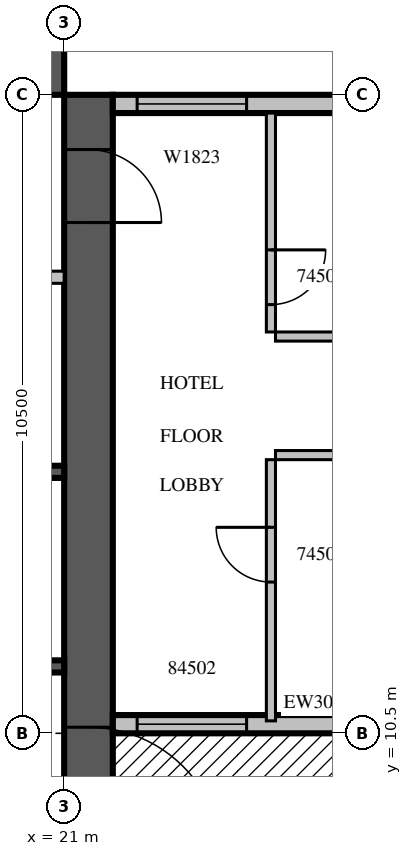
"""IFC4 building model, lengths in metres.
Left out: names, types, materials, properties, quantities, classifications, styles, units other than length and angle.
Written with IfcOpenShell. Run it as: python <this file> out.ifc"""

import sys

from ifc_helpers import new_model, si_unit, direction, frame, frame_2d, origin, place, context, subcontext, project, spatial, rectangle, extrude, source, transform, mapped, element, fill, save


model = new_model("IFC4")
c1 = context("Model", 3, precision=1e-05, world=origin(), true_north=direction((0.0, 1.0)))
c2 = subcontext(c1, "Body", "Model", "MODEL_VIEW")
j1 = project(units=[si_unit("LENGTHUNIT", "METRE"), si_unit("PLANEANGLEUNIT", "RADIAN")], contexts=[c1])
p1 = place(None, origin())
s1 = spatial("IfcSite", under=j1, at=p1, CompositionType="ELEMENT")
p2 = place(p1, origin())
s2 = spatial("IfcBuilding", under=s1, at=p2, CompositionType="ELEMENT")
p3 = place(p2, frame((0.0, 0.0, 204.4)))
s3 = spatial("IfcBuildingStorey", under=s2, at=p3, CompositionType="ELEMENT", Elevation=204.4)
m1 = source(origin(), c2, "Body", "SweptSolid", [
    extrude(rectangle(XDim=16.8, YDim=0.8, at=frame_2d((8.4, 0.0))), origin(), (0.0, 0.0, 1.0), 3.8),
])
p4 = place(p3, frame((21.4, 4.2, 0.0), z_axis=(0.0, 0.0, 1.0), x_axis=(0.0, 1.0, 0.0)))
e1 = element("IfcWall", 1, at=p4, inside=s3, PredefinedType="SHEAR", context=c2, shape_type="MappedRepresentation", body=[
    mapped(m1, transform((0.0, 0.0, 0.0), scale=1.0)),
])
m2 = source(origin(), c2, "Body", "SweptSolid", [
    extrude(rectangle(XDim=2.2, YDim=2.1, at=frame_2d((1.1, 1.05))), frame((0.0, 0.41, 0.0), z_axis=(0.0, -1.0, 0.0), x_axis=(1.0, 0.0, 0.0)), (0.0, 0.0, 1.0), 0.82),
])
p5 = place(p4, frame((4.2, 0.0, 0.0)))
e2 = element("IfcOpeningElement", 2, at=p5, cuts=e1, PredefinedType="OPENING", context=c2, shape_type="MappedRepresentation", body=[
    mapped(m2, transform((0.0, 0.0, 0.0), scale=1.0)),
])
m3 = source(origin(), c2, "Body", "SweptSolid", [
    extrude(rectangle(XDim=1.2, YDim=2.1, at=frame_2d((0.6, 1.05))), frame((0.0, 0.41, 0.0), z_axis=(0.0, -1.0, 0.0), x_axis=(1.0, 0.0, 0.0)), (0.0, 0.0, 1.0), 0.82),
])
p6 = place(p4, frame((14.7, 0.0, 0.0)))
e3 = element("IfcOpeningElement", 3, at=p6, cuts=e1, PredefinedType="OPENING", context=c2, shape_type="MappedRepresentation", body=[
    mapped(m3, transform((0.0, 0.0, 0.0), scale=1.0)),
])
p7 = place(p3, frame((4.2, 21.4, 0.0), z_axis=(0.0, 0.0, 1.0), x_axis=(1.0, 0.0, 0.0)))
e4 = element("IfcWall", 4, at=p7, inside=s3, PredefinedType="SHEAR", context=c2, shape_type="MappedRepresentation", body=[
    mapped(m1, transform((0.0, 0.0, 0.0), scale=1.0)),
])
p8 = place(p7, frame((6.2, 0.0, 0.0)))
e5 = element("IfcOpeningElement", 5, at=p8, cuts=e4, PredefinedType="OPENING", context=c2, shape_type="MappedRepresentation", body=[
    mapped(m3, transform((0.0, 0.0, 0.0), scale=1.0)),
])
p9 = place(p3, frame((21.8, 10.65, 0.0), z_axis=(0.0, 0.0, 1.0), x_axis=(1.0, 0.0, 0.0)))
e6 = element("IfcWall", 6, at=p9, inside=s3, PredefinedType="STANDARD", context=c2, shape_type="SweptSolid", body=[
    extrude(rectangle(XDim=7.15, YDim=0.3, at=frame_2d((3.575, 0.0))), origin(), (0.0, 0.0, 1.0), 2.4),
])
m4 = source(origin(), c2, "Body", "SweptSolid", [
    extrude(rectangle(XDim=1.8, YDim=2.4, at=frame_2d((0.9, 1.2))), frame((0.0, 0.16, 0.0), z_axis=(0.0, -1.0, 0.0), x_axis=(1.0, 0.0, 0.0)), (0.0, 0.0, 1.0), 0.32),
])
p10 = place(p9, frame((0.4, 0.0, 0.0)))
e7 = element("IfcOpeningElement", 7, at=p10, cuts=e6, PredefinedType="OPENING", context=c2, shape_type="MappedRepresentation", body=[
    mapped(m4, transform((0.0, 0.0, 0.0), scale=1.0)),
])
p11 = place(p9, frame((4.6, 0.0, 0.0)))
e8 = element("IfcOpeningElement", 8, at=p11, cuts=e6, PredefinedType="OPENING", context=c2, shape_type="MappedRepresentation", body=[
    mapped(m4, transform((0.0, 0.0, 0.0), scale=1.0)),
])
m5 = source(origin(), c2, "Body", "SweptSolid", [
    extrude(rectangle(XDim=7.15, YDim=0.3, at=frame_2d((3.575, 0.0))), origin(), (0.0, 0.0, 1.0), 3.4),
])
p12 = place(p3, frame((28.95, 20.85, 0.0), z_axis=(0.0, 0.0, 1.0), x_axis=(-1.0, 0.0, 0.0)))
e9 = element("IfcWall", 9, at=p12, inside=s3, PredefinedType="STANDARD", context=c2, shape_type="MappedRepresentation", body=[
    mapped(m5, transform((0.0, 0.0, 0.0), scale=1.0)),
])
m6 = source(origin(), c2, "Body", "SweptSolid", [
    extrude(rectangle(XDim=3.0, YDim=2.3, at=frame_2d((1.5, 1.15))), frame((0.0, 0.16, 0.0), z_axis=(0.0, -1.0, 0.0), x_axis=(1.0, 0.0, 0.0)), (0.0, 0.0, 1.0), 0.32),
])
p13 = place(p12, frame((0.15, 0.0, 0.6)))
e10 = element("IfcOpeningElement", 10, at=p13, cuts=e9, PredefinedType="OPENING", context=c2, shape_type="MappedRepresentation", body=[
    mapped(m6, transform((0.0, 0.0, 0.0), scale=1.0)),
])
m7 = source(origin(), c2, "Body", "SweptSolid", [
    extrude(rectangle(XDim=1.8, YDim=2.3, at=frame_2d((0.9, 1.15))), frame((0.0, 0.16, 0.0), z_axis=(0.0, -1.0, 0.0), x_axis=(1.0, 0.0, 0.0)), (0.0, 0.0, 1.0), 0.32),
])
p14 = place(p12, frame((4.95, 0.0, 0.6)))
e11 = element("IfcOpeningElement", 11, at=p14, cuts=e9, PredefinedType="OPENING", context=c2, shape_type="MappedRepresentation", body=[
    mapped(m7, transform((0.0, 0.0, 0.0), scale=1.0)),
])
m8 = source(origin(), c2, "Body", "SweptSolid", [
    extrude(rectangle(XDim=9.6, YDim=0.2, at=frame_2d((4.8, 0.0))), origin(), (0.0, 0.0, 1.0), 3.8),
])
p15 = place(p3, frame((11.4, 11.6, 0.0), z_axis=(0.0, 0.0, 1.0), x_axis=(1.0, 0.0, 0.0)))
e12 = element("IfcWall", 12, at=p15, inside=s3, PredefinedType="SOLIDWALL", context=c2, shape_type="MappedRepresentation", body=[
    mapped(m8, transform((0.0, 0.0, 0.0), scale=1.0)),
])
p16 = place(p3, frame((11.4, 14.8, 0.0), z_axis=(0.0, 0.0, 1.0), x_axis=(1.0, 0.0, 0.0)))
e13 = element("IfcWall", 13, at=p16, inside=s3, PredefinedType="SOLIDWALL", context=c2, shape_type="MappedRepresentation", body=[
    mapped(m8, transform((0.0, 0.0, 0.0), scale=1.0)),
])
m9 = source(origin(), c2, "Body", "SweptSolid", [
    extrude(rectangle(XDim=1.1, YDim=2.1, at=frame_2d((0.55, 1.05))), frame((0.0, 0.11, 0.0), z_axis=(0.0, -1.0, 0.0), x_axis=(1.0, 0.0, 0.0)), (0.0, 0.0, 1.0), 0.22),
])
p17 = place(p16, frame((3.05, 0.0, 0.0)))
e14 = element("IfcOpeningElement", 14, at=p17, cuts=e13, PredefinedType="OPENING", context=c2, shape_type="MappedRepresentation", body=[
    mapped(m9, transform((0.0, 0.0, 0.0), scale=1.0)),
])
p18 = place(p16, frame((5.45, 0.0, 0.0)))
e15 = element("IfcOpeningElement", 15, at=p18, cuts=e13, PredefinedType="OPENING", context=c2, shape_type="MappedRepresentation", body=[
    mapped(m9, transform((0.0, 0.0, 0.0), scale=1.0)),
])
p19 = place(p16, frame((7.85, 0.0, 0.0)))
e16 = element("IfcOpeningElement", 16, at=p19, cuts=e13, PredefinedType="OPENING", context=c2, shape_type="MappedRepresentation", body=[
    mapped(m9, transform((0.0, 0.0, 0.0), scale=1.0)),
])
m10 = source(origin(), c2, "Body", "SweptSolid", [
    extrude(rectangle(XDim=11.45, YDim=0.2, at=frame_2d((5.725, 0.0))), origin(), (0.0, 0.0, 1.0), 3.4),
])
p20 = place(p3, frame((9.55, 18.0, 0.0), z_axis=(0.0, 0.0, 1.0), x_axis=(1.0, 0.0, 0.0)))
e17 = element("IfcWall", 17, at=p20, inside=s3, PredefinedType="PARTITIONING", context=c2, shape_type="MappedRepresentation", body=[
    mapped(m10, transform((0.0, 0.0, 0.0), scale=1.0)),
])
m11 = source(origin(), c2, "Body", "SweptSolid", [
    extrude(rectangle(XDim=0.9, YDim=2.1, at=frame_2d((0.45, 1.05))), frame((0.0, 0.11, 0.0), z_axis=(0.0, -1.0, 0.0), x_axis=(1.0, 0.0, 0.0)), (0.0, 0.0, 1.0), 0.22),
])
p21 = place(p20, frame((0.725, 0.0, 0.0)))
e18 = element("IfcOpeningElement", 18, at=p21, cuts=e17, PredefinedType="OPENING", context=c2, shape_type="MappedRepresentation", body=[
    mapped(m11, transform((0.0, 0.0, 0.0), scale=1.0)),
])
p22 = place(p20, frame((2.775, 0.0, 0.0)))
e19 = element("IfcOpeningElement", 19, at=p22, cuts=e17, PredefinedType="OPENING", context=c2, shape_type="MappedRepresentation", body=[
    mapped(m11, transform((0.0, 0.0, 0.0), scale=1.0)),
])
p23 = place(p20, frame((7.35, 0.0, 0.0)))
e20 = element("IfcOpeningElement", 20, at=p23, cuts=e17, PredefinedType="OPENING", context=c2, shape_type="MappedRepresentation", body=[
    mapped(m9, transform((0.0, 0.0, 0.0), scale=1.0)),
])
m12 = source(origin(), c2, "Body", "SweptSolid", [
    extrude(rectangle(XDim=4.295, YDim=0.15, at=frame_2d((2.147, 0.0))), origin(), (0.0, 0.0, 1.0), 3.4),
])
p24 = place(p3, frame((24.4, 15.0, 0.0), z_axis=(0.0, 0.0, 1.0), x_axis=(0.0, -1.0, 0.0)))
e21 = element("IfcWall", 21, at=p24, inside=s3, PredefinedType="PARTITIONING", context=c2, shape_type="MappedRepresentation", body=[
    mapped(m12, transform((0.0, 0.0, 0.0), scale=1.0)),
])
m13 = source(origin(), c2, "Body", "SweptSolid", [
    extrude(rectangle(XDim=0.9, YDim=2.1, at=frame_2d((0.45, 1.05))), frame((0.0, 0.085, 0.0), z_axis=(0.0, -1.0, 0.0), x_axis=(1.0, 0.0, 0.0)), (0.0, 0.0, 1.0), 0.17),
])
p25 = place(p24, frame((1.113, 0.0, 0.0)))
e22 = element("IfcOpeningElement", 22, at=p25, cuts=e21, PredefinedType="OPENING", context=c2, shape_type="MappedRepresentation", body=[
    mapped(m13, transform((0.0, 0.0, 0.0), scale=1.0)),
])
m14 = source(origin(), c2, "Body", "SweptSolid", [
    extrude(rectangle(XDim=3.6, YDim=0.15, at=frame_2d((1.8, 0.0))), origin(), (0.0, 0.0, 1.0), 3.4),
])
p26 = place(p3, frame((24.4, 20.7, 0.0), z_axis=(0.0, 0.0, 1.0), x_axis=(0.0, -1.0, 0.0)))
e23 = element("IfcWall", 23, at=p26, inside=s3, PredefinedType="PARTITIONING", context=c2, shape_type="MappedRepresentation", body=[
    mapped(m14, transform((0.0, 0.0, 0.0), scale=1.0)),
])
p27 = place(p26, frame((2.25, 0.0, 0.0)))
e24 = element("IfcOpeningElement", 24, at=p27, cuts=e23, PredefinedType="OPENING", context=c2, shape_type="MappedRepresentation", body=[
    mapped(m13, transform((0.0, 0.0, 0.0), scale=1.0)),
])
m15 = source(origin(), c2, "Body", "SweptSolid", [
    extrude(rectangle(XDim=4.85, YDim=0.15, at=frame_2d((2.425, 0.0))), origin(), (0.0, 0.0, 1.0), 3.4),
])
for number, where, z_axis, x_axis in (
    (25, (29.325, 15.075, 0.0), (0.0, 0.0, 1.0), (-1.0, 0.0, 0.0)),
    (26, (24.475, 17.025, 0.0), (0.0, 0.0, 1.0), (1.0, 0.0, 0.0)),
):
    element("IfcWall", number, at=place(p3, frame(where, z_axis=z_axis, x_axis=x_axis)), inside=s3, PredefinedType="PARTITIONING", context=c2, shape_type="MappedRepresentation", body=[
        mapped(m15, transform((0.0, 0.0, 0.0), scale=1.0)),
    ])
m16 = source(origin(), c2, "Body", "SweptSolid", [
    extrude(rectangle(XDim=1.8, YDim=2.4, at=frame_2d((0.9, 1.2))), frame((0.0, 0.025, 0.0), z_axis=(0.0, -1.0, 0.0), x_axis=(1.0, 0.0, 0.0)), (0.0, 0.0, 1.0), 0.05),
])
p28 = place(p10, origin())
e27 = element("IfcDoor", 27, at=p28, inside=s3, OperationType="SLIDING_TO_LEFT", PredefinedType="DOOR", context=c2, shape_type="MappedRepresentation", body=[
    mapped(m16, transform((0.0, 0.0, 0.0), scale=1.0)),
])
fill(e7, e27)
m17 = source(origin(), c2, "Body", "SweptSolid", [
    extrude(rectangle(XDim=1.8, YDim=2.3, at=frame_2d((0.9, 1.15))), frame((0.0, 0.03, 0.0), z_axis=(0.0, -1.0, 0.0), x_axis=(1.0, 0.0, 0.0)), (0.0, 0.0, 1.0), 0.06),
])
p29 = place(p14, origin())
e28 = element("IfcWindow", 28, at=p29, inside=s3, PartitioningType="SINGLE_PANEL", PredefinedType="WINDOW", context=c2, shape_type="MappedRepresentation", body=[
    mapped(m17, transform((0.0, 0.0, 0.0), scale=1.0)),
])
fill(e11, e28)
m18 = source(origin(), c2, "Body", "SweptSolid", [
    extrude(rectangle(XDim=2.2, YDim=2.1, at=frame_2d((1.1, 1.05))), frame((0.0, 0.025, 0.0), z_axis=(0.0, -1.0, 0.0), x_axis=(1.0, 0.0, 0.0)), (0.0, 0.0, 1.0), 0.05),
])
p30 = place(p5, origin())
e29 = element("IfcDoor", 29, at=p30, inside=s3, OperationType="DOUBLE_DOOR_SINGLE_SWING", PredefinedType="DOOR", context=c2, shape_type="MappedRepresentation", body=[
    mapped(m18, transform((0.0, 0.0, 0.0), scale=1.0)),
])
fill(e2, e29)
m19 = source(origin(), c2, "Body", "SweptSolid", [
    extrude(rectangle(XDim=1.2, YDim=2.1, at=frame_2d((0.6, 1.05))), frame((0.0, 0.025, 0.0), z_axis=(0.0, -1.0, 0.0), x_axis=(1.0, 0.0, 0.0)), (0.0, 0.0, 1.0), 0.05),
])
p31 = place(p6, origin())
e30 = element("IfcDoor", 30, at=p31, inside=s3, OperationType="SINGLE_SWING_RIGHT", PredefinedType="DOOR", context=c2, shape_type="MappedRepresentation", body=[
    mapped(m19, transform((0.0, 0.0, 0.0), scale=1.0)),
])
fill(e3, e30)
m20 = source(origin(), c2, "Body", "SweptSolid", [
    extrude(rectangle(XDim=0.9, YDim=2.1, at=frame_2d((0.45, 1.05))), frame((0.0, 0.025, 0.0), z_axis=(0.0, -1.0, 0.0), x_axis=(1.0, 0.0, 0.0)), (0.0, 0.0, 1.0), 0.05),
])
p32 = place(p25, origin())
e31 = element("IfcDoor", 31, at=p32, inside=s3, OperationType="SINGLE_SWING_RIGHT", PredefinedType="DOOR", context=c2, shape_type="MappedRepresentation", body=[
    mapped(m20, transform((0.0, 0.0, 0.0), scale=1.0)),
])
fill(e22, e31)
p33 = place(p27, origin())
e32 = element("IfcDoor", 32, at=p33, inside=s3, OperationType="SINGLE_SWING_LEFT", PredefinedType="DOOR", context=c2, shape_type="MappedRepresentation", body=[
    mapped(m20, transform((0.0, 0.0, 0.0), scale=1.0)),
])
fill(e24, e32)
save(model, sys.argv[1])
